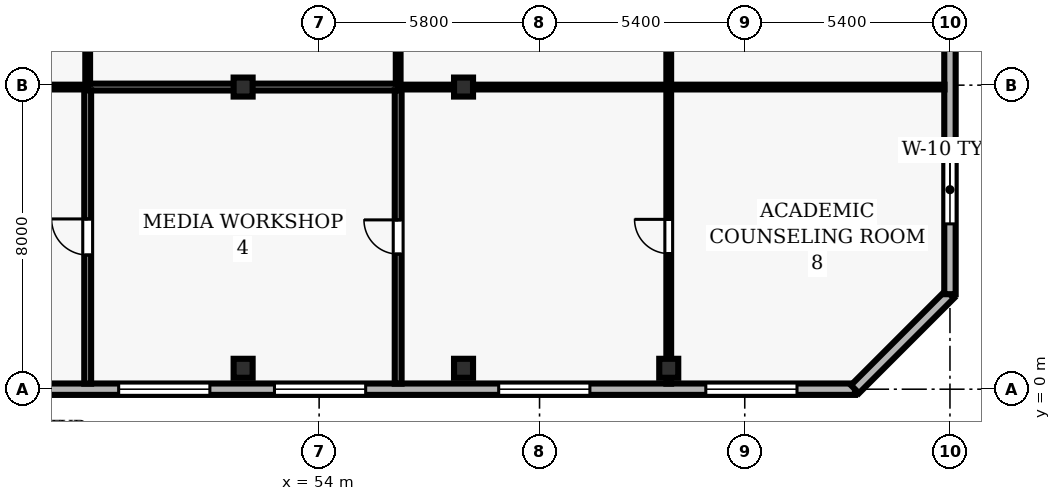
"""IFC4 building model, lengths in metres.
Left out: names, types, materials, properties, quantities, classifications, styles, units other than length and angle.
Written with IfcOpenShell. Run it as: python <this file> out.ifc"""

import sys

from ifc_helpers import new_model, si_unit, direction, frame, frame_2d, origin, origin_2d, place, context, subcontext, project, spatial, rectangle, hollow_rectangle, extrude, element, fill, save


model = new_model("IFC4")
c1 = context("Model", 3, precision=1e-05, world=origin(), true_north=direction((0.0, 1.0)))
c2 = subcontext(c1, "Body", "Model", "MODEL_VIEW")
j1 = project(units=[si_unit("LENGTHUNIT", "METRE"), si_unit("PLANEANGLEUNIT", "RADIAN")], contexts=[c1])
p1 = place(None, origin())
s1 = spatial("IfcSite", under=j1, at=p1, CompositionType="ELEMENT")
p2 = place(p1, origin())
s2 = spatial("IfcBuilding", under=s1, at=p2, CompositionType="ELEMENT")
p3 = place(p2, frame((0.0, 0.0, 130.7)))
s3 = spatial("IfcBuildingStorey", under=s2, at=p3, CompositionType="ELEMENT", Elevation=130.7)
for number, where, z_axis, x_axis in (
    (1, (52.0, 0.55, 0.0), (0.0, 0.0, 1.0), (1.0, 0.0, 0.0)),
    (2, (52.0, 7.95, 0.0), (0.0, 0.0, 1.0), (1.0, 0.0, 0.0)),
    (3, (57.8, 0.55, 0.0), (0.0, 0.0, 1.0), (1.0, 0.0, 0.0)),
    (4, (57.8, 7.95, 0.0), (0.0, 0.0, 1.0), (1.0, 0.0, 0.0)),
    (5, (63.2, 0.55, 0.0), (0.0, 0.0, 1.0), (1.0, 0.0, 0.0)),
):
    element("IfcColumn", number, at=place(p3, frame(where, z_axis=z_axis, x_axis=x_axis)), inside=s3, PredefinedType="COLUMN", context=c2, shape_type="SweptSolid", body=[
        extrude(hollow_rectangle(XDim=0.5, YDim=0.5, WallThickness=0.025, at=origin_2d()), origin(), (0.0, 0.0, 1.0), 3.9),
    ])
p4 = place(p3, frame((24.5, 0.0, 0.0), z_axis=(0.0, 0.0, 1.0), x_axis=(1.0, 0.0, 0.0)))
e6 = element("IfcWall", 6, at=p4, inside=s3, PredefinedType="SOLIDWALL", context=c2, shape_type="SweptSolid", body=[
    extrude(rectangle(XDim=43.6, YDim=0.3, at=frame_2d((21.8, 0.0))), origin(), (0.0, 0.0, 1.0), 3.69),
])
p5 = place(p4, frame((1.525, 0.0, 0.9)))
e7 = element("IfcOpeningElement", 7, at=p5, cuts=e6, PredefinedType="OPENING", context=c2, shape_type="SweptSolid", body=[
    extrude(rectangle(XDim=2.4, YDim=1.8, at=frame_2d((1.2, 0.9))), frame((0.0, 0.16, 0.0), z_axis=(0.0, -1.0, 0.0), x_axis=(1.0, 0.0, 0.0)), (0.0, 0.0, 1.0), 0.32),
])
p6 = place(p4, frame((17.875, 0.0, 0.9)))
e8 = element("IfcOpeningElement", 8, at=p6, cuts=e6, PredefinedType="OPENING", context=c2, shape_type="SweptSolid", body=[
    extrude(rectangle(XDim=2.4, YDim=1.8, at=frame_2d((1.2, 0.9))), frame((0.0, 0.16, 0.0), z_axis=(0.0, -1.0, 0.0), x_axis=(1.0, 0.0, 0.0)), (0.0, 0.0, 1.0), 0.32),
])
p7 = place(p4, frame((24.225, 0.0, 0.9)))
e9 = element("IfcOpeningElement", 9, at=p7, cuts=e6, PredefinedType="OPENING", context=c2, shape_type="SweptSolid", body=[
    extrude(rectangle(XDim=2.4, YDim=1.8, at=frame_2d((1.2, 0.9))), frame((0.0, 0.16, 0.0), z_axis=(0.0, -1.0, 0.0), x_axis=(1.0, 0.0, 0.0)), (0.0, 0.0, 1.0), 0.32),
])
p8 = place(p4, frame((28.325, 0.0, 0.9)))
e10 = element("IfcOpeningElement", 10, at=p8, cuts=e6, PredefinedType="OPENING", context=c2, shape_type="SweptSolid", body=[
    extrude(rectangle(XDim=2.4, YDim=1.8, at=frame_2d((1.2, 0.9))), frame((0.0, 0.16, 0.0), z_axis=(0.0, -1.0, 0.0), x_axis=(1.0, 0.0, 0.0)), (0.0, 0.0, 1.0), 0.32),
])
p9 = place(p4, frame((34.225, 0.0, 0.9)))
e11 = element("IfcOpeningElement", 11, at=p9, cuts=e6, PredefinedType="OPENING", context=c2, shape_type="SweptSolid", body=[
    extrude(rectangle(XDim=2.4, YDim=1.8, at=frame_2d((1.2, 0.9))), frame((0.0, 0.16, 0.0), z_axis=(0.0, -1.0, 0.0), x_axis=(1.0, 0.0, 0.0)), (0.0, 0.0, 1.0), 0.32),
])
p10 = place(p4, frame((39.675, 0.0, 0.9)))
e12 = element("IfcOpeningElement", 12, at=p10, cuts=e6, PredefinedType="OPENING", context=c2, shape_type="SweptSolid", body=[
    extrude(rectangle(XDim=2.4, YDim=1.8, at=frame_2d((1.2, 0.9))), frame((0.0, 0.16, 0.0), z_axis=(0.0, -1.0, 0.0), x_axis=(1.0, 0.0, 0.0)), (0.0, 0.0, 1.0), 0.32),
])
p11 = place(p3, frame((68.1, 0.0, 0.0), z_axis=(0.0, 0.0, 1.0), x_axis=(0.707106781187, 0.707106781187, 0.0)))
e13 = element("IfcWall", 13, at=p11, inside=s3, PredefinedType="SOLIDWALL", context=c2, shape_type="SweptSolid", body=[
    extrude(rectangle(XDim=3.536, YDim=0.3, at=frame_2d((1.768, 0.0))), origin(), (0.0, 0.0, 1.0), 3.69),
])
p12 = place(p3, frame((70.6, 2.5, 0.0), z_axis=(0.0, 0.0, 1.0), x_axis=(0.0, 1.0, 0.0)))
e14 = element("IfcWall", 14, at=p12, inside=s3, PredefinedType="SOLIDWALL", context=c2, shape_type="SweptSolid", body=[
    extrude(rectangle(XDim=11.0, YDim=0.3, at=frame_2d((5.5, 0.0))), origin(), (0.0, 0.0, 1.0), 3.69),
])
p13 = place(p12, frame((1.85, 0.0, 0.9)))
e15 = element("IfcOpeningElement", 15, at=p13, cuts=e14, PredefinedType="OPENING", context=c2, shape_type="SweptSolid", body=[
    extrude(rectangle(XDim=1.8, YDim=2.2, at=frame_2d((0.9, 1.1))), frame((0.0, 0.16, 0.0), z_axis=(0.0, -1.0, 0.0), x_axis=(1.0, 0.0, 0.0)), (0.0, 0.0, 1.0), 0.32),
])
p14 = place(p12, frame((7.35, 0.0, 0.9)))
e16 = element("IfcOpeningElement", 16, at=p14, cuts=e14, PredefinedType="OPENING", context=c2, shape_type="SweptSolid", body=[
    extrude(rectangle(XDim=1.8, YDim=2.2, at=frame_2d((0.9, 1.1))), frame((0.0, 0.16, 0.0), z_axis=(0.0, -1.0, 0.0), x_axis=(1.0, 0.0, 0.0)), (0.0, 0.0, 1.0), 0.32),
])
p15 = place(p3, frame((47.91, 7.95, 0.0), z_axis=(0.0, 0.0, 1.0), x_axis=(-1.0, 0.0, 0.0)))
e17 = element("IfcWall", 17, at=p15, inside=s3, PredefinedType="PARTITIONING", context=c2, shape_type="SweptSolid", body=[
    extrude(rectangle(XDim=7.56, YDim=0.125, at=frame_2d((3.78, 0.0))), origin(), (0.0, 0.0, 1.0), 3.073),
])
p16 = place(p3, frame((56.08, 7.95, 0.0), z_axis=(0.0, 0.0, 1.0), x_axis=(-1.0, 0.0, 0.0)))
e18 = element("IfcWall", 18, at=p16, inside=s3, PredefinedType="PARTITIONING", context=c2, shape_type="SweptSolid", body=[
    extrude(rectangle(XDim=8.17, YDim=0.18, at=frame_2d((4.085, 0.0))), origin(), (0.0, 0.0, 1.0), 3.073),
])
p17 = place(p3, frame((63.2, 7.95, 0.0), z_axis=(0.0, 0.0, 1.0), x_axis=(-1.0, 0.0, 0.0)))
e19 = element("IfcWall", 19, at=p17, inside=s3, PredefinedType="PARTITIONING", context=c2, shape_type="SweptSolid", body=[
    extrude(rectangle(XDim=7.12, YDim=0.125, at=frame_2d((3.56, 0.0))), origin(), (0.0, 0.0, 1.0), 3.073),
])
p18 = place(p3, frame((70.455, 7.95, 0.0), z_axis=(0.0, 0.0, 1.0), x_axis=(-1.0, 0.0, 0.0)))
e20 = element("IfcWall", 20, at=p18, inside=s3, PredefinedType="PARTITIONING", context=c2, shape_type="SweptSolid", body=[
    extrude(rectangle(XDim=7.255, YDim=0.125, at=frame_2d((3.627, 0.0))), origin(), (0.0, 0.0, 1.0), 3.69),
])
p19 = place(p3, frame((47.91, 0.145, 0.0), z_axis=(0.0, 0.0, 1.0), x_axis=(0.0, 1.0, 0.0)))
e21 = element("IfcWall", 21, at=p19, inside=s3, PredefinedType="PARTITIONING", context=c2, shape_type="SweptSolid", body=[
    extrude(rectangle(XDim=7.72, YDim=0.18, at=frame_2d((3.86, 0.0))), origin(), (0.0, 0.0, 1.0), 3.69),
])
p20 = place(p19, frame((3.385, 0.0, 0.0)))
e22 = element("IfcOpeningElement", 22, at=p20, cuts=e21, PredefinedType="OPENING", context=c2, shape_type="SweptSolid", body=[
    extrude(rectangle(XDim=0.95, YDim=2.1, at=frame_2d((0.475, 1.05))), frame((0.0, 0.1, 0.0), z_axis=(0.0, -1.0, 0.0), x_axis=(1.0, 0.0, 0.0)), (0.0, 0.0, 1.0), 0.2),
])
p21 = place(p3, frame((47.91, 8.035, 0.0), z_axis=(0.0, 0.0, 1.0), x_axis=(0.0, 1.0, 0.0)))
e23 = element("IfcWall", 23, at=p21, inside=s3, PredefinedType="PARTITIONING", context=c2, shape_type="SweptSolid", body=[
    extrude(rectangle(XDim=5.54, YDim=0.125, at=frame_2d((2.77, 0.0))), origin(), (0.0, 0.0, 1.0), 3.69),
])
p22 = place(p3, frame((56.08, 0.145, 0.0), z_axis=(0.0, 0.0, 1.0), x_axis=(0.0, 1.0, 0.0)))
e24 = element("IfcWall", 24, at=p22, inside=s3, PredefinedType="PARTITIONING", context=c2, shape_type="SweptSolid", body=[
    extrude(rectangle(XDim=7.72, YDim=0.18, at=frame_2d((3.86, 0.0))), origin(), (0.0, 0.0, 1.0), 3.69),
])
p23 = place(p22, frame((3.41, 0.0, 0.0)))
e25 = element("IfcOpeningElement", 25, at=p23, cuts=e24, PredefinedType="OPENING", context=c2, shape_type="SweptSolid", body=[
    extrude(rectangle(XDim=0.9, YDim=2.1, at=frame_2d((0.45, 1.05))), frame((0.0, 0.1, 0.0), z_axis=(0.0, -1.0, 0.0), x_axis=(1.0, 0.0, 0.0)), (0.0, 0.0, 1.0), 0.2),
])
p24 = place(p3, frame((56.08, 8.035, 0.0), z_axis=(0.0, 0.0, 1.0), x_axis=(0.0, 1.0, 0.0)))
e26 = element("IfcWall", 26, at=p24, inside=s3, PredefinedType="PARTITIONING", context=c2, shape_type="SweptSolid", body=[
    extrude(rectangle(XDim=5.54, YDim=0.125, at=frame_2d((2.77, 0.0))), origin(), (0.0, 0.0, 1.0), 3.69),
])
p25 = place(p3, frame((63.2, 0.145, 0.0), z_axis=(0.0, 0.0, 1.0), x_axis=(0.0, 1.0, 0.0)))
e27 = element("IfcWall", 27, at=p25, inside=s3, PredefinedType="PARTITIONING", context=c2, shape_type="SweptSolid", body=[
    extrude(rectangle(XDim=7.748, YDim=0.125, at=frame_2d((3.874, 0.0))), origin(), (0.0, 0.0, 1.0), 3.073),
])
p26 = place(p25, frame((3.424, 0.0, 0.0)))
e28 = element("IfcOpeningElement", 28, at=p26, cuts=e27, PredefinedType="OPENING", context=c2, shape_type="SweptSolid", body=[
    extrude(rectangle(XDim=0.9, YDim=2.1, at=frame_2d((0.45, 1.05))), frame((0.0, 0.073, 0.0), z_axis=(0.0, -1.0, 0.0), x_axis=(1.0, 0.0, 0.0)), (0.0, 0.0, 1.0), 0.145),
])
p27 = place(p3, frame((63.2, 8.008, 0.0), z_axis=(0.0, 0.0, 1.0), x_axis=(0.0, 1.0, 0.0)))
e29 = element("IfcWall", 29, at=p27, inside=s3, PredefinedType="PARTITIONING", context=c2, shape_type="SweptSolid", body=[
    extrude(rectangle(XDim=5.567, YDim=0.125, at=frame_2d((2.783, 0.0))), origin(), (0.0, 0.0, 1.0), 3.073),
])
p28 = place(p7, origin())
e30 = element("IfcWindow", 30, at=p28, inside=s3, PartitioningType="SINGLE_PANEL", PredefinedType="WINDOW", context=c2, shape_type="SweptSolid", body=[
    extrude(rectangle(XDim=2.4, YDim=1.8, at=frame_2d((1.2, 0.9))), frame((0.0, 0.03, 0.0), z_axis=(0.0, -1.0, 0.0), x_axis=(1.0, 0.0, 0.0)), (0.0, 0.0, 1.0), 0.06),
])
fill(e9, e30)
p29 = place(p8, origin())
e31 = element("IfcWindow", 31, at=p29, inside=s3, PartitioningType="SINGLE_PANEL", PredefinedType="WINDOW", context=c2, shape_type="SweptSolid", body=[
    extrude(rectangle(XDim=2.4, YDim=1.8, at=frame_2d((1.2, 0.9))), frame((0.0, 0.03, 0.0), z_axis=(0.0, -1.0, 0.0), x_axis=(1.0, 0.0, 0.0)), (0.0, 0.0, 1.0), 0.06),
])
fill(e10, e31)
p30 = place(p9, origin())
e32 = element("IfcWindow", 32, at=p30, inside=s3, PartitioningType="SINGLE_PANEL", PredefinedType="WINDOW", context=c2, shape_type="SweptSolid", body=[
    extrude(rectangle(XDim=2.4, YDim=1.8, at=frame_2d((1.2, 0.9))), frame((0.0, 0.03, 0.0), z_axis=(0.0, -1.0, 0.0), x_axis=(1.0, 0.0, 0.0)), (0.0, 0.0, 1.0), 0.06),
])
fill(e11, e32)
p31 = place(p10, origin())
e33 = element("IfcWindow", 33, at=p31, inside=s3, PartitioningType="SINGLE_PANEL", PredefinedType="WINDOW", context=c2, shape_type="SweptSolid", body=[
    extrude(rectangle(XDim=2.4, YDim=1.8, at=frame_2d((1.2, 0.9))), frame((0.0, 0.03, 0.0), z_axis=(0.0, -1.0, 0.0), x_axis=(1.0, 0.0, 0.0)), (0.0, 0.0, 1.0), 0.06),
])
fill(e12, e33)
p32 = place(p13, origin())
e34 = element("IfcWindow", 34, at=p32, inside=s3, PartitioningType="SINGLE_PANEL", PredefinedType="WINDOW", context=c2, shape_type="SweptSolid", body=[
    extrude(rectangle(XDim=1.8, YDim=2.2, at=frame_2d((0.9, 1.1))), frame((0.0, 0.03, 0.0), z_axis=(0.0, -1.0, 0.0), x_axis=(1.0, 0.0, 0.0)), (0.0, 0.0, 1.0), 0.06),
])
fill(e15, e34)
p33 = place(p20, origin())
e35 = element("IfcDoor", 35, at=p33, inside=s3, OperationType="SINGLE_SWING_RIGHT", PredefinedType="DOOR", context=c2, shape_type="SweptSolid", body=[
    extrude(rectangle(XDim=0.95, YDim=2.1, at=frame_2d((0.475, 1.05))), frame((0.0, 0.025, 0.0), z_axis=(0.0, -1.0, 0.0), x_axis=(1.0, 0.0, 0.0)), (0.0, 0.0, 1.0), 0.05),
])
fill(e22, e35)
p34 = place(p23, origin())
e36 = element("IfcDoor", 36, at=p34, inside=s3, OperationType="SINGLE_SWING_RIGHT", PredefinedType="DOOR", context=c2, shape_type="SweptSolid", body=[
    extrude(rectangle(XDim=0.9, YDim=2.1, at=frame_2d((0.45, 1.05))), frame((0.0, 0.025, 0.0), z_axis=(0.0, -1.0, 0.0), x_axis=(1.0, 0.0, 0.0)), (0.0, 0.0, 1.0), 0.05),
])
fill(e25, e36)
p35 = place(p26, origin())
e37 = element("IfcDoor", 37, at=p35, inside=s3, OperationType="SINGLE_SWING_RIGHT", PredefinedType="DOOR", context=c2, shape_type="SweptSolid", body=[
    extrude(rectangle(XDim=0.9, YDim=2.1, at=frame_2d((0.45, 1.05))), frame((0.0, 0.025, 0.0), z_axis=(0.0, -1.0, 0.0), x_axis=(1.0, 0.0, 0.0)), (0.0, 0.0, 1.0), 0.05),
])
fill(e28, e37)
save(model, sys.argv[1])
